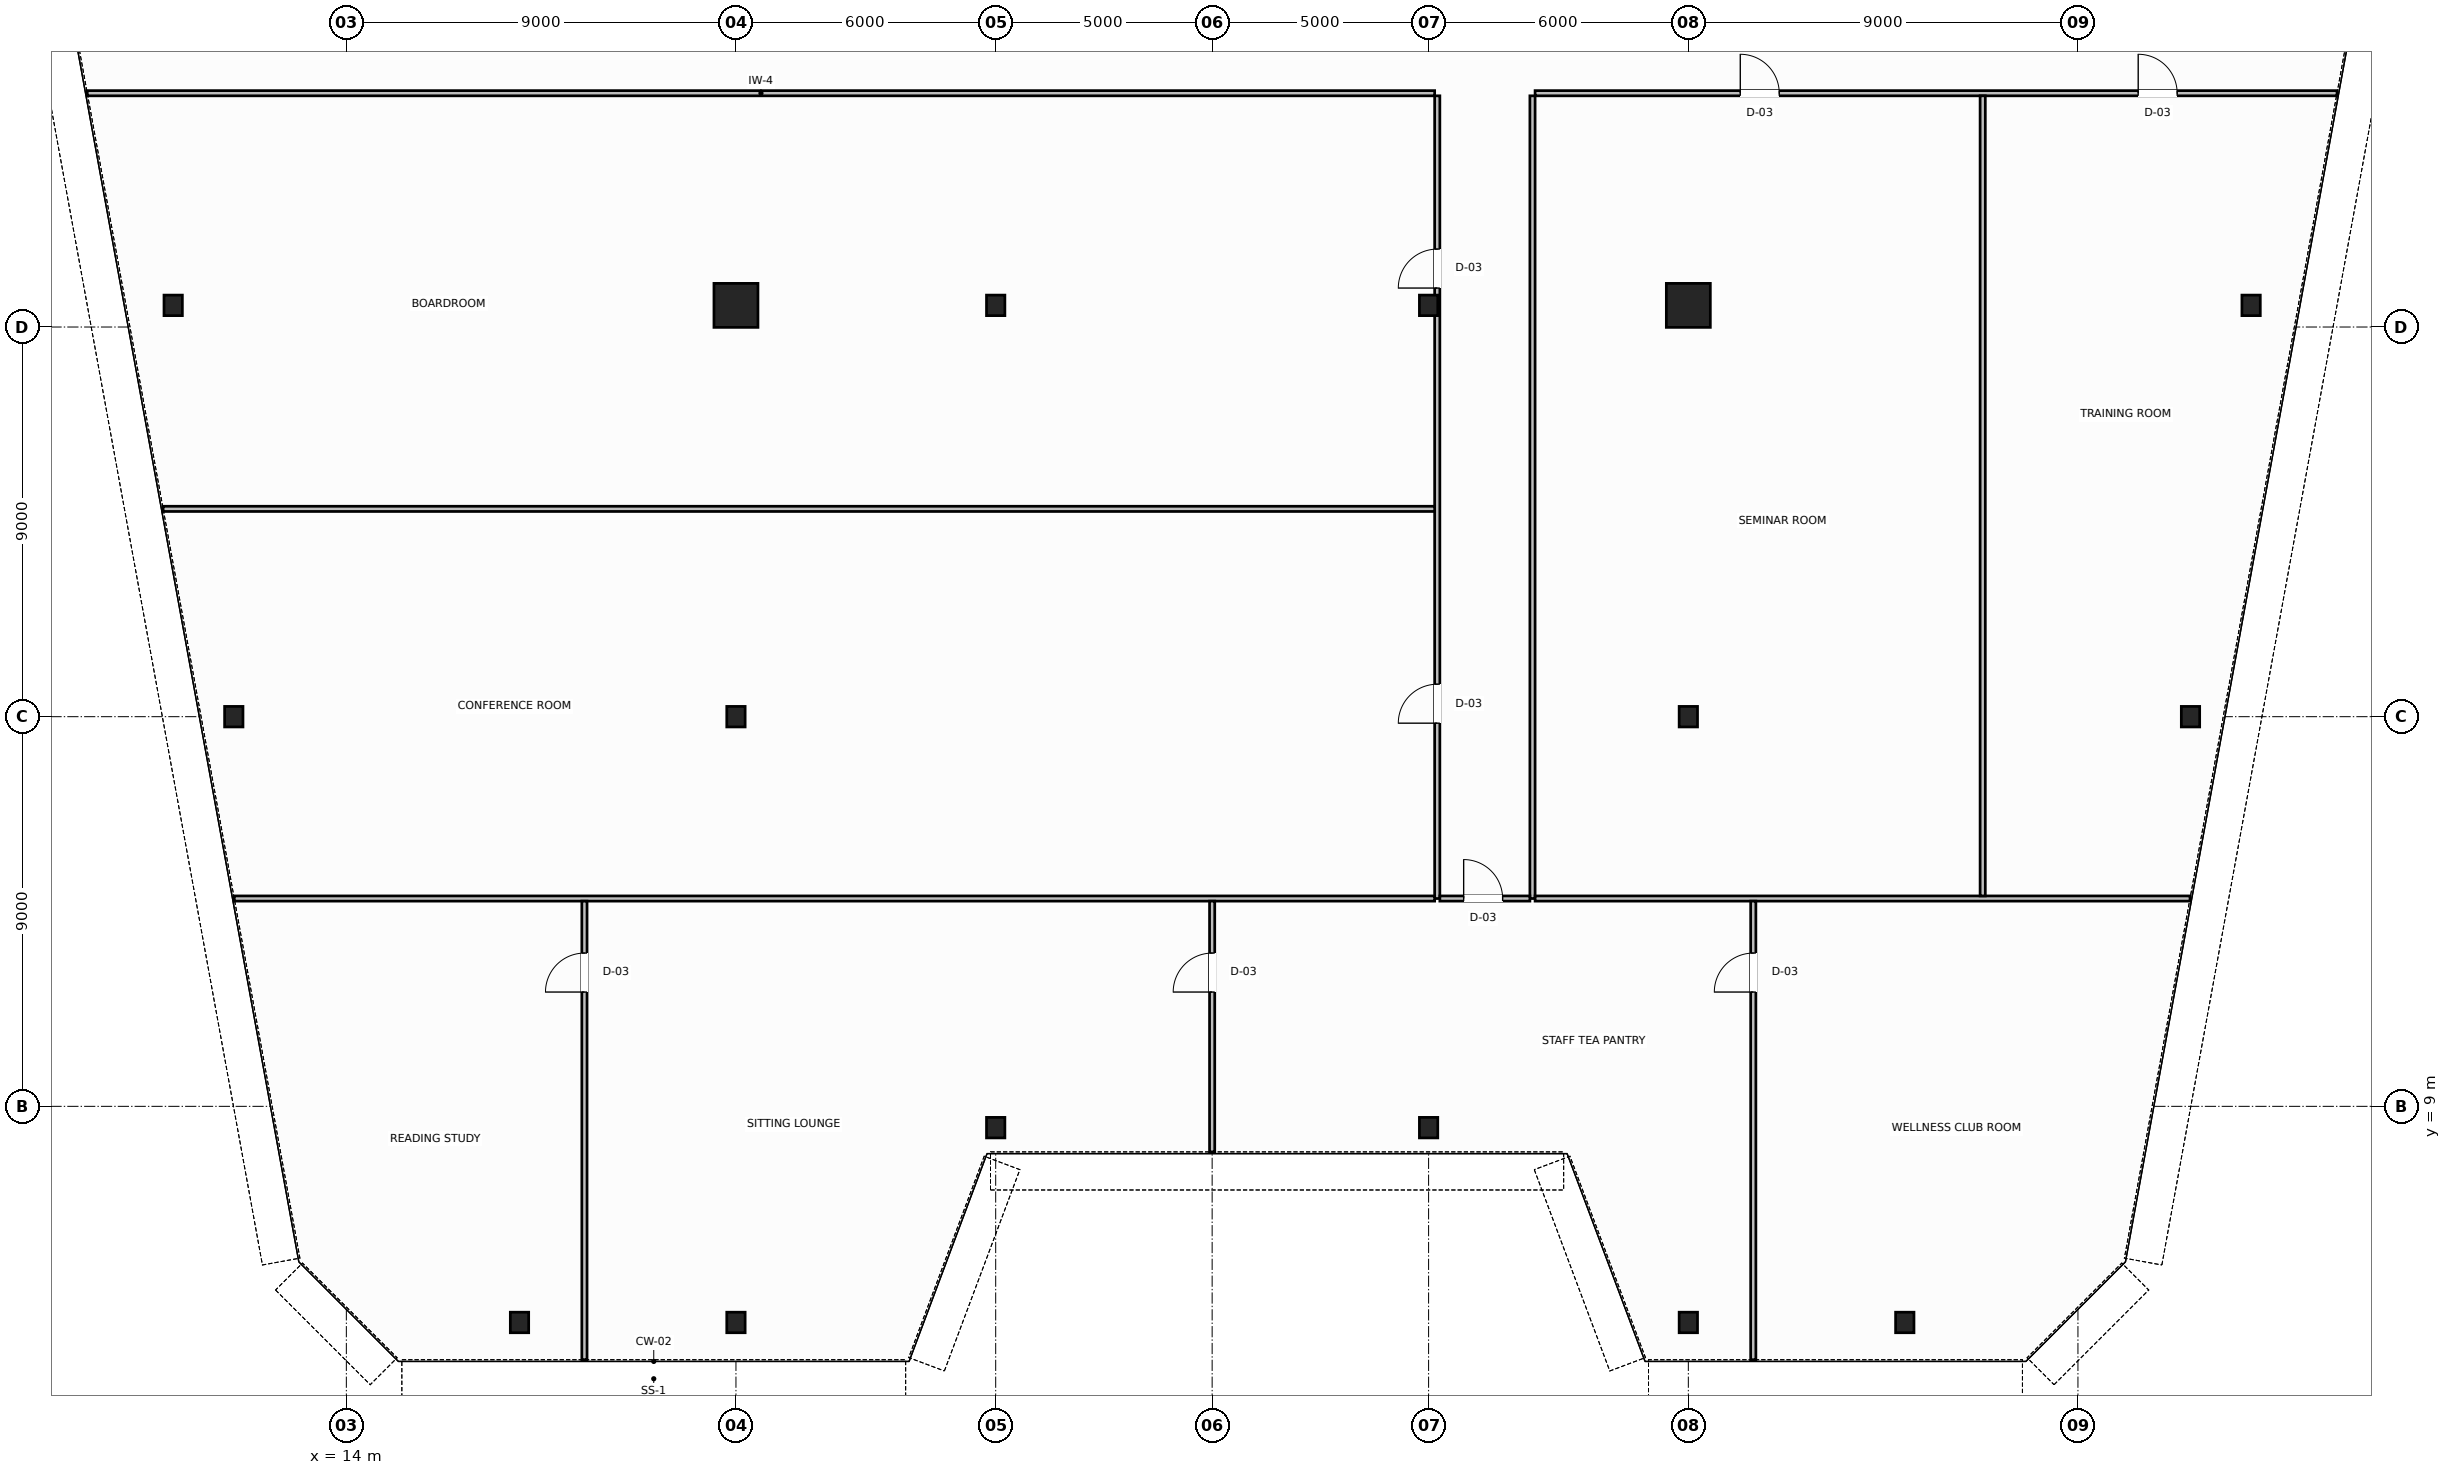
"""IFC4 building model, lengths in metres.
Left out: names, types, materials, properties, quantities, classifications, styles, units other than length and angle.
Written with IfcOpenShell. Run it as: python <this file> out.ifc"""

import sys

from ifc_helpers import new_model, si_unit, direction, frame, frame_2d, origin, origin_2d, place, context, subcontext, project, spatial, rectangle, hollow_circle, i_section, extrude, source, transform, mapped, element, fill, save


model = new_model("IFC4")
c1 = context("Model", 3, precision=1e-05, world=origin(), true_north=direction((0.0, 1.0)))
c2 = subcontext(c1, "Body", "Model", "MODEL_VIEW")
j1 = project(units=[si_unit("LENGTHUNIT", "METRE"), si_unit("PLANEANGLEUNIT", "RADIAN")], contexts=[c1])
p1 = place(None, origin())
s1 = spatial("IfcSite", under=j1, at=p1, CompositionType="ELEMENT")
p2 = place(p1, origin())
s2 = spatial("IfcBuilding", under=s1, at=p2, CompositionType="ELEMENT")
p3 = place(p2, frame((0.0, 0.0, 95.8)))
s3 = spatial("IfcBuildingStorey", under=s2, at=p3, CompositionType="ELEMENT", Elevation=95.8)
m1 = source(origin(), c2, "Body", "SweptSolid", [
    extrude(i_section(OverallWidth=0.424, OverallDepth=0.474, WebThickness=0.047, FlangeThickness=0.065, FilletRadius=0.015, at=origin_2d()), origin(), (0.0, 0.0, 1.0), 3.8),
])
for number, where, z_axis, x_axis in (
    (1, (10.0, 27.5, 0.0), (0.0, 0.0, 1.0), (1.0, 0.0, 0.0)),
    (2, (11.4, 18.0, 0.0), (0.0, 0.0, 1.0), (1.0, 0.0, 0.0)),
    (3, (58.0, 27.5, 0.0), (0.0, 0.0, 1.0), (1.0, 0.0, 0.0)),
    (4, (56.6, 18.0, 0.0), (0.0, 0.0, 1.0), (1.0, 0.0, 0.0)),
):
    element("IfcColumn", number, at=place(p3, frame(where, z_axis=z_axis, x_axis=x_axis)), inside=s3, PredefinedType="COLUMN", context=c2, shape_type="MappedRepresentation", body=[
        mapped(m1, transform((0.0, 0.0, 0.0), scale=1.0)),
    ])
m2 = source(origin(), c2, "Body", "SweptSolid", [
    extrude(hollow_circle(Radius=0.508, WallThickness=0.045, at=origin_2d()), origin(), (0.0, 0.0, 1.0), 3.8),
])
p4 = place(p3, frame((23.0, 27.5, 0.0), z_axis=(0.0, 0.0, 1.0), x_axis=(1.0, 0.0, 0.0)))
e5 = element("IfcColumn", 5, at=p4, inside=s3, PredefinedType="COLUMN", context=c2, shape_type="MappedRepresentation", body=[
    mapped(m2, transform((0.0, 0.0, 0.0), scale=1.0)),
])
m3 = source(origin(), c2, "Body", "SweptSolid", [
    extrude(i_section(OverallWidth=0.424, OverallDepth=0.474, WebThickness=0.047, FlangeThickness=0.065, FilletRadius=0.015, at=origin_2d()), origin(), (0.0, 0.0, 1.0), 3.8),
])
for number, where, z_axis, x_axis in (
    (6, (29.0, 27.5, 0.0), (0.0, 0.0, 1.0), (1.0, 0.0, 0.0)),
    (7, (39.0, 27.5, 0.0), (0.0, 0.0, 1.0), (1.0, 0.0, 0.0)),
):
    element("IfcColumn", number, at=place(p3, frame(where, z_axis=z_axis, x_axis=x_axis)), inside=s3, PredefinedType="COLUMN", context=c2, shape_type="MappedRepresentation", body=[
        mapped(m3, transform((0.0, 0.0, 0.0), scale=1.0)),
    ])
p5 = place(p3, frame((45.0, 27.5, 0.0), z_axis=(0.0, 0.0, 1.0), x_axis=(1.0, 0.0, 0.0)))
e8 = element("IfcColumn", 8, at=p5, inside=s3, PredefinedType="COLUMN", context=c2, shape_type="MappedRepresentation", body=[
    mapped(m2, transform((0.0, 0.0, 0.0), scale=1.0)),
])
for number, where, z_axis, x_axis in (
    (9, (23.0, 18.0, 0.0), (0.0, 0.0, 1.0), (1.0, 0.0, 0.0)),
    (10, (45.0, 18.0, 0.0), (0.0, 0.0, 1.0), (1.0, 0.0, 0.0)),
):
    element("IfcColumn", number, at=place(p3, frame(where, z_axis=z_axis, x_axis=x_axis)), inside=s3, PredefinedType="COLUMN", context=c2, shape_type="MappedRepresentation", body=[
        mapped(m3, transform((0.0, 0.0, 0.0), scale=1.0)),
    ])
m4 = source(origin(), c2, "Body", "SweptSolid", [
    extrude(i_section(OverallWidth=0.424, OverallDepth=0.474, WebThickness=0.047, FlangeThickness=0.065, FilletRadius=0.015, at=origin_2d()), origin(), (0.0, 0.0, 1.0), 3.744),
])
for number, where, z_axis, x_axis in (
    (11, (18.0, 4.008, 0.032), (0.0, -0.064, 0.998), (1.0, 0.0, 0.0)),
    (12, (23.0, 4.008, 0.032), (0.0, -0.064, 0.998), (1.0, 0.0, 0.0)),
    (13, (29.0, 8.508, 0.032), (0.0, -0.064, 0.998), (1.0, 0.0, 0.0)),
    (14, (39.0, 8.508, 0.032), (0.0, -0.064, 0.998), (1.0, 0.0, 0.0)),
    (15, (45.0, 4.008, 0.032), (0.0, -0.064, 0.998), (1.0, 0.0, 0.0)),
    (16, (50.0, 4.008, 0.032), (0.0, -0.064, 0.998), (1.0, 0.0, 0.0)),
):
    element("IfcColumn", number, at=place(p3, frame(where, z_axis=z_axis, x_axis=x_axis)), inside=s3, PredefinedType="COLUMN", context=c2, shape_type="MappedRepresentation", body=[
        mapped(m4, transform((0.0, 0.0, 0.0), scale=1.0)),
    ])
p6 = place(p3, frame((8.015, 32.4, 0.0), z_axis=(0.0, 0.0, 1.0), x_axis=(1.0, 0.0, 0.0)))
e17 = element("IfcWall", 17, at=p6, inside=s3, PredefinedType="PARTITIONING", context=c2, shape_type="SweptSolid", body=[
    extrude(rectangle(XDim=31.125, YDim=0.12, at=frame_2d((15.562, 0.0))), origin(), (0.0, 0.0, 1.0), 3.58),
])
p7 = place(p3, frame((41.46, 32.4, 0.0), z_axis=(0.0, 0.0, 1.0), x_axis=(1.0, 0.0, 0.0)))
e18 = element("IfcWall", 18, at=p7, inside=s3, PredefinedType="PARTITIONING", context=c2, shape_type="SweptSolid", body=[
    extrude(rectangle(XDim=18.525, YDim=0.12, at=frame_2d((9.262, 0.0))), origin(), (0.0, 0.0, 1.0), 3.58),
])
p8 = place(p7, frame((4.74, 0.0, 0.0)))
e19 = element("IfcOpeningElement", 19, at=p8, cuts=e18, PredefinedType="OPENING", context=c2, shape_type="SweptSolid", body=[
    extrude(rectangle(XDim=0.9, YDim=2.15, at=frame_2d((0.45, 1.075))), frame((0.0, 0.07, 0.0), z_axis=(0.0, -1.0, 0.0), x_axis=(1.0, 0.0, 0.0)), (0.0, 0.0, 1.0), 0.14),
])
p9 = place(p7, frame((13.932, 0.0, 0.0)))
e20 = element("IfcOpeningElement", 20, at=p9, cuts=e18, PredefinedType="OPENING", context=c2, shape_type="SweptSolid", body=[
    extrude(rectangle(XDim=0.9, YDim=2.15, at=frame_2d((0.45, 1.075))), frame((0.0, 0.07, 0.0), z_axis=(0.0, -1.0, 0.0), x_axis=(1.0, 0.0, 0.0)), (0.0, 0.0, 1.0), 0.14),
])
p10 = place(p3, frame((39.2, 13.8, 0.0), z_axis=(0.0, 0.0, 1.0), x_axis=(0.0, 1.0, 0.0)))
e21 = element("IfcWall", 21, at=p10, inside=s3, PredefinedType="PARTITIONING", context=c2, shape_type="SweptSolid", body=[
    extrude(rectangle(XDim=18.54, YDim=0.12, at=frame_2d((9.27, 0.0))), origin(), (0.0, 0.0, 1.0), 2.87),
])
p11 = place(p10, frame((4.05, 0.0, 0.0)))
e22 = element("IfcOpeningElement", 22, at=p11, cuts=e21, PredefinedType="OPENING", context=c2, shape_type="SweptSolid", body=[
    extrude(rectangle(XDim=0.9, YDim=2.15, at=frame_2d((0.45, 1.075))), frame((0.0, 0.07, 0.0), z_axis=(0.0, -1.0, 0.0), x_axis=(1.0, 0.0, 0.0)), (0.0, 0.0, 1.0), 0.14),
])
p12 = place(p10, frame((14.1, 0.0, 0.0)))
e23 = element("IfcOpeningElement", 23, at=p12, cuts=e21, PredefinedType="OPENING", context=c2, shape_type="SweptSolid", body=[
    extrude(rectangle(XDim=0.9, YDim=2.15, at=frame_2d((0.45, 1.075))), frame((0.0, 0.07, 0.0), z_axis=(0.0, -1.0, 0.0), x_axis=(1.0, 0.0, 0.0)), (0.0, 0.0, 1.0), 0.14),
])
p13 = place(p3, frame((41.4, 13.8, 0.0), z_axis=(0.0, 0.0, 1.0), x_axis=(0.0, 1.0, 0.0)))
e24 = element("IfcWall", 24, at=p13, inside=s3, PredefinedType="PARTITIONING", context=c2, shape_type="SweptSolid", body=[
    extrude(rectangle(XDim=18.54, YDim=0.12, at=frame_2d((9.27, 0.0))), origin(), (0.0, 0.0, 1.0), 3.58),
])
p14 = place(p3, frame((39.26, 13.8, 0.0), z_axis=(0.0, 0.0, 1.0), x_axis=(1.0, 0.0, 0.0)))
e25 = element("IfcWall", 25, at=p14, inside=s3, PredefinedType="PARTITIONING", context=c2, shape_type="SweptSolid", body=[
    extrude(rectangle(XDim=2.08, YDim=0.12, at=frame_2d((1.04, 0.0))), origin(), (0.0, 0.0, 1.0), 3.58),
])
p15 = place(p14, frame((0.55, 0.0, 0.0)))
e26 = element("IfcOpeningElement", 26, at=p15, cuts=e25, PredefinedType="OPENING", context=c2, shape_type="SweptSolid", body=[
    extrude(rectangle(XDim=0.9, YDim=2.15, at=frame_2d((0.45, 1.075))), frame((0.0, 0.07, 0.0), z_axis=(0.0, -1.0, 0.0), x_axis=(1.0, 0.0, 0.0)), (0.0, 0.0, 1.0), 0.14),
])
p16 = place(p3, frame((11.41, 13.8, 0.0), z_axis=(0.0, 0.0, 1.0), x_axis=(1.0, 0.0, 0.0)))
e27 = element("IfcWall", 27, at=p16, inside=s3, PredefinedType="PARTITIONING", context=c2, shape_type="SweptSolid", body=[
    extrude(rectangle(XDim=27.729, YDim=0.12, at=frame_2d((13.865, 0.0))), origin(), (0.0, 0.0, 1.0), 3.58),
])
p17 = place(p3, frame((41.46, 13.8, 0.0), z_axis=(0.0, 0.0, 1.0), x_axis=(1.0, 0.0, 0.0)))
e28 = element("IfcWall", 28, at=p17, inside=s3, PredefinedType="PARTITIONING", context=c2, shape_type="SweptSolid", body=[
    extrude(rectangle(XDim=15.13, YDim=0.12, at=frame_2d((7.565, 0.0))), origin(), (0.0, 0.0, 1.0), 3.58),
])
p18 = place(p3, frame((19.5, 3.148, 0.0), z_axis=(0.0, 0.0, 1.0), x_axis=(0.0, 1.0, 0.0)))
e29 = element("IfcWall", 29, at=p18, inside=s3, PredefinedType="PARTITIONING", context=c2, shape_type="SweptSolid", body=[
    extrude(rectangle(XDim=10.592, YDim=0.12, at=frame_2d((5.296, 0.0))), origin(), (0.0, 0.0, 1.0), 3.58),
])
p19 = place(p18, frame((8.492, 0.0, 0.0)))
e30 = element("IfcOpeningElement", 30, at=p19, cuts=e29, PredefinedType="OPENING", context=c2, shape_type="SweptSolid", body=[
    extrude(rectangle(XDim=0.9, YDim=2.15, at=frame_2d((0.45, 1.075))), frame((0.0, 0.07, 0.0), z_axis=(0.0, -1.0, 0.0), x_axis=(1.0, 0.0, 0.0)), (0.0, 0.0, 1.0), 0.14),
])
p20 = place(p3, frame((34.0, 7.948, 0.0), z_axis=(0.0, 0.0, 1.0), x_axis=(0.0, 1.0, 0.0)))
e31 = element("IfcWall", 31, at=p20, inside=s3, PredefinedType="PARTITIONING", context=c2, shape_type="SweptSolid", body=[
    extrude(rectangle(XDim=5.792, YDim=0.12, at=frame_2d((2.896, 0.0))), origin(), (0.0, 0.0, 1.0), 3.58),
])
p21 = place(p20, frame((3.692, 0.0, 0.0)))
e32 = element("IfcOpeningElement", 32, at=p21, cuts=e31, PredefinedType="OPENING", context=c2, shape_type="SweptSolid", body=[
    extrude(rectangle(XDim=0.9, YDim=2.15, at=frame_2d((0.45, 1.075))), frame((0.0, 0.07, 0.0), z_axis=(0.0, -1.0, 0.0), x_axis=(1.0, 0.0, 0.0)), (0.0, 0.0, 1.0), 0.14),
])
p22 = place(p3, frame((46.5, 3.148, 0.0), z_axis=(0.0, 0.0, 1.0), x_axis=(0.0, 1.0, 0.0)))
e33 = element("IfcWall", 33, at=p22, inside=s3, PredefinedType="PARTITIONING", context=c2, shape_type="SweptSolid", body=[
    extrude(rectangle(XDim=10.592, YDim=0.12, at=frame_2d((5.296, 0.0))), origin(), (0.0, 0.0, 1.0), 3.58),
])
p23 = place(p22, frame((8.492, 0.0, 0.0)))
e34 = element("IfcOpeningElement", 34, at=p23, cuts=e33, PredefinedType="OPENING", context=c2, shape_type="SweptSolid", body=[
    extrude(rectangle(XDim=0.9, YDim=2.15, at=frame_2d((0.45, 1.075))), frame((0.0, 0.07, 0.0), z_axis=(0.0, -1.0, 0.0), x_axis=(1.0, 0.0, 0.0)), (0.0, 0.0, 1.0), 0.14),
])
p24 = place(p3, frame((9.768, 22.8, 0.0), z_axis=(0.0, 0.0, 1.0), x_axis=(1.0, 0.0, 0.0)))
e35 = element("IfcWall", 35, at=p24, inside=s3, PredefinedType="PARTITIONING", context=c2, shape_type="SweptSolid", body=[
    extrude(rectangle(XDim=29.372, YDim=0.12, at=frame_2d((14.686, 0.0))), origin(), (0.0, 0.0, 1.0), 3.58),
])
p25 = place(p3, frame((51.8, 13.86, 0.0), z_axis=(0.0, 0.0, 1.0), x_axis=(0.0, 1.0, 0.0)))
e36 = element("IfcWall", 36, at=p25, inside=s3, PredefinedType="PARTITIONING", context=c2, shape_type="SweptSolid", body=[
    extrude(rectangle(XDim=18.48, YDim=0.12, at=frame_2d((9.24, 0.0))), origin(), (0.0, 0.0, 1.0), 3.58),
])
m5 = source(origin(), c2, "Body", "SweptSolid", [
    extrude(rectangle(XDim=0.9, YDim=2.15, at=frame_2d((0.45, 1.075))), frame((0.0, 0.025, 0.0), z_axis=(0.0, -1.0, 0.0), x_axis=(1.0, 0.0, 0.0)), (0.0, 0.0, 1.0), 0.05),
])
p26 = place(p19, origin())
e37 = element("IfcDoor", 37, at=p26, inside=s3, OperationType="SINGLE_SWING_RIGHT", PredefinedType="DOOR", context=c2, shape_type="MappedRepresentation", body=[
    mapped(m5, transform((0.0, 0.0, 0.0), scale=1.0)),
])
fill(e30, e37)
p27 = place(p21, origin())
e38 = element("IfcDoor", 38, at=p27, inside=s3, OperationType="SINGLE_SWING_LEFT", PredefinedType="DOOR", context=c2, shape_type="MappedRepresentation", body=[
    mapped(m5, transform((0.0, 0.0, 0.0), scale=1.0)),
])
fill(e32, e38)
p28 = place(p15, origin())
e39 = element("IfcDoor", 39, at=p28, inside=s3, OperationType="SINGLE_SWING_LEFT", PredefinedType="DOOR", context=c2, shape_type="MappedRepresentation", body=[
    mapped(m5, transform((0.0, 0.0, 0.0), scale=1.0)),
])
fill(e26, e39)
p29 = place(p23, origin())
e40 = element("IfcDoor", 40, at=p29, inside=s3, OperationType="SINGLE_SWING_RIGHT", PredefinedType="DOOR", context=c2, shape_type="MappedRepresentation", body=[
    mapped(m5, transform((0.0, 0.0, 0.0), scale=1.0)),
])
fill(e34, e40)
p30 = place(p11, origin())
e41 = element("IfcDoor", 41, at=p30, inside=s3, OperationType="SINGLE_SWING_LEFT", PredefinedType="DOOR", context=c2, shape_type="MappedRepresentation", body=[
    mapped(m5, transform((0.0, 0.0, 0.0), scale=1.0)),
])
fill(e22, e41)
p31 = place(p12, origin())
e42 = element("IfcDoor", 42, at=p31, inside=s3, OperationType="SINGLE_SWING_RIGHT", PredefinedType="DOOR", context=c2, shape_type="MappedRepresentation", body=[
    mapped(m5, transform((0.0, 0.0, 0.0), scale=1.0)),
])
fill(e23, e42)
p32 = place(p8, origin())
e43 = element("IfcDoor", 43, at=p32, inside=s3, OperationType="SINGLE_SWING_RIGHT", PredefinedType="DOOR", context=c2, shape_type="MappedRepresentation", body=[
    mapped(m5, transform((0.0, 0.0, 0.0), scale=1.0)),
])
fill(e19, e43)
p33 = place(p9, origin())
e44 = element("IfcDoor", 44, at=p33, inside=s3, OperationType="SINGLE_SWING_LEFT", PredefinedType="DOOR", context=c2, shape_type="MappedRepresentation", body=[
    mapped(m5, transform((0.0, 0.0, 0.0), scale=1.0)),
])
fill(e20, e44)
save(model, sys.argv[1])
